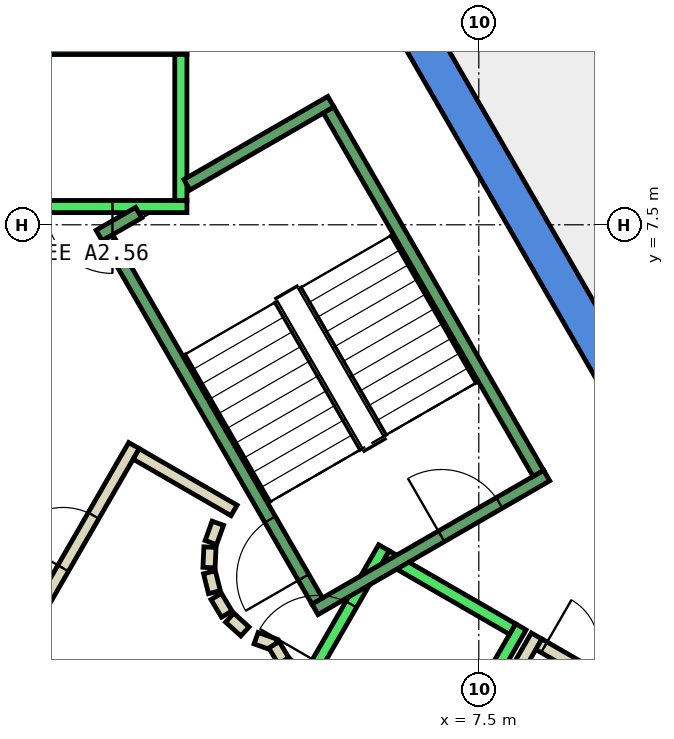
"""IFC4 building model, lengths in metres.
Left out: names, types, materials, properties, quantities, classifications, styles, units other than length and angle.
Written with IfcOpenShell. Run it as: python <this file> out.ifc"""

import sys

from ifc_helpers import new_model, si_unit, direction, frame, frame_2d, origin, place, context, subcontext, project, spatial, polyline, rectangle, outline, extrude, element, fill, save


model = new_model("IFC4")
c1 = context("Model", 3, precision=1e-05, world=origin(), true_north=direction((0.0, 1.0)))
c2 = subcontext(c1, "Body", "Model", "MODEL_VIEW")
j1 = project(units=[si_unit("LENGTHUNIT", "METRE"), si_unit("PLANEANGLEUNIT", "RADIAN")], contexts=[c1])
p1 = place(None, origin())
s1 = spatial("IfcSite", under=j1, at=p1, CompositionType="ELEMENT")
p2 = place(p1, origin())
s2 = spatial("IfcBuilding", under=s1, at=p2, CompositionType="ELEMENT")
p3 = place(p2, frame((0.0, 0.0, 266.6)))
s3 = spatial("IfcBuildingStorey", under=s2, at=p3, CompositionType="ELEMENT", Elevation=266.6)
p4 = place(p3, frame((0.0, 0.0, -0.34)))
e1 = element("IfcWall", 1, at=p4, inside=s3, PredefinedType="SHEAR", context=c2, shape_type="SweptSolid", body=[
    extrude(outline(polyline([(6.786, 10.747), (6.266, 10.447), (10.854, 2.5), (11.547, 2.5), (6.786, 10.747)])), origin(), (0.0, 0.0, 1.0), 3.6),
])
p5 = place(p3, frame((0.0, 0.0, -0.34)))
e2 = element("IfcWall", 2, at=p5, inside=s3, PredefinedType="SHEAR", context=c2, shape_type="SweptSolid", body=[
    extrude(outline(polyline([(5.774, -7.5), (11.547, 2.5), (10.854, 2.5), (5.427, -6.9), (5.774, -7.5)])), origin(), (0.0, 0.0, 1.0), 3.6),
])
p6 = place(p3, frame((9.281, 12.779, 0.0), z_axis=(0.0, 0.0, 1.0), x_axis=(0.515568955032, -0.856848091908, 0.0)))
e3 = element("IfcWall", 3, at=p6, inside=s3, PredefinedType="PARTITIONING", context=c2, shape_type="SweptSolid", body=[
    extrude(rectangle(XDim=3.177, YDim=0.2, at=frame_2d((1.588, 0.0))), origin(), (0.0, 0.0, 1.0), 3.26),
])
p7 = place(p3, frame((5.751, -3.938, 0.0), z_axis=(0.0, 0.0, 1.0), x_axis=(0.500034260056, 0.866005622828, 0.0)))
e4 = element("IfcWall", 4, at=p7, inside=s3, PredefinedType="PARTITIONING", context=c2, shape_type="SweptSolid", body=[
    extrude(rectangle(XDim=5.399, YDim=0.2, at=frame_2d((2.7, 0.0))), origin(), (0.0, 0.0, 1.0), 3.26),
])
p8 = place(p3, frame((8.488, 0.602, 0.0), z_axis=(0.0, 0.0, 1.0), x_axis=(0.866063652425, -0.499933745558, 0.0)))
e5 = element("IfcWall", 5, at=p8, inside=s3, PredefinedType="PARTITIONING", context=c2, shape_type="SweptSolid", body=[
    extrude(rectangle(XDim=1.1, YDim=0.2, at=frame_2d((0.55, 0.0))), origin(), (0.0, 0.0, 1.0), 3.26),
])
p9 = place(p8, frame((0.1, 0.0, 0.0)))
e6 = element("IfcOpeningElement", 6, at=p9, cuts=e5, PredefinedType="OPENING", context=c2, shape_type="SweptSolid", body=[
    extrude(rectangle(XDim=0.9, YDim=2.1, at=frame_2d((0.45, 1.05))), frame((0.0, 0.11, 0.0), z_axis=(0.0, -1.0, 0.0), x_axis=(1.0, 0.0, 0.0)), (0.0, 0.0, 1.0), 0.22),
])
p10 = place(p3, frame((0.05, 0.787, 0.0), z_axis=(0.0, 0.0, 1.0), x_axis=(0.499954076797, 0.866051915934, 0.0)))
e7 = element("IfcWall", 7, at=p10, inside=s3, PredefinedType="PARTITIONING", context=c2, shape_type="SweptSolid", body=[
    extrude(rectangle(XDim=3.558, YDim=0.2, at=frame_2d((1.779, 0.0))), origin(), (0.0, 0.0, 1.0), 3.26),
])
p11 = place(p10, frame((1.229, 0.0, 0.0)))
e8 = element("IfcOpeningElement", 8, at=p11, cuts=e7, PredefinedType="OPENING", context=c2, shape_type="SweptSolid", body=[
    extrude(rectangle(XDim=1.0, YDim=2.1, at=frame_2d((0.5, 1.05))), frame((0.0, 0.11, 0.0), z_axis=(0.0, -1.0, 0.0), x_axis=(1.0, 0.0, 0.0)), (0.0, 0.0, 1.0), 0.22),
])
p12 = place(p3, frame((1.866, 3.732, 0.0), z_axis=(0.0, 0.0, 1.0), x_axis=(0.866043361281, -0.499968895414, 0.0)))
e9 = element("IfcWall", 9, at=p12, inside=s3, PredefinedType="PARTITIONING", context=c2, shape_type="SweptSolid", body=[
    extrude(rectangle(XDim=1.858, YDim=0.2, at=frame_2d((0.929, 0.0))), origin(), (0.0, 0.0, 1.0), 3.26),
])
p13 = place(p3, frame((3.208, 2.592, 0.0), z_axis=(0.0, 0.0, 1.0), x_axis=(-0.337388820924, -0.941365382578, 0.0)))
e10 = element("IfcWall", 10, at=p13, inside=s3, PredefinedType="PARTITIONING", context=c2, shape_type="SweptSolid", body=[
    extrude(rectangle(XDim=0.338, YDim=0.2, at=frame_2d((0.169, 0.0))), origin(), (0.0, 0.0, 1.0), 3.26),
])
p14 = place(p3, frame((3.079, 2.199, 0.0), z_axis=(0.0, 0.0, 1.0), x_axis=(-0.047771483479, -0.998858290933, 0.0)))
e11 = element("IfcWall", 11, at=p14, inside=s3, PredefinedType="PARTITIONING", context=c2, shape_type="SweptSolid", body=[
    extrude(rectangle(XDim=0.337, YDim=0.2, at=frame_2d((0.169, 0.0))), origin(), (0.0, 0.0, 1.0), 3.26),
])
p15 = place(p3, frame((3.07, 1.786, 0.0), z_axis=(0.0, 0.0, 1.0), x_axis=(0.242705583207, -0.970099994784, 0.0)))
e12 = element("IfcWall", 12, at=p15, inside=s3, PredefinedType="PARTITIONING", context=c2, shape_type="SweptSolid", body=[
    extrude(rectangle(XDim=0.338, YDim=0.2, at=frame_2d((0.169, 0.0))), origin(), (0.0, 0.0, 1.0), 3.26),
])
for number, where, z_axis, x_axis in (
    (13, (3.182, 1.388, 0.0), (0.0, 0.0, 1.0), (0.512, -0.859, 0.0)),
    (14, (3.404, 1.039, 0.0), (0.0, 0.0, 1.0), (0.74, -0.672, 0.0)),
):
    element("IfcWall", number, at=place(p3, frame(where, z_axis=z_axis, x_axis=x_axis)), inside=s3, PredefinedType="PARTITIONING", context=c2, shape_type="SweptSolid", body=[
        extrude(rectangle(XDim=0.338, YDim=0.2, at=frame_2d((0.169, 0.0))), origin(), (0.0, 0.0, 1.0), 3.26),
    ])
p16 = place(p3, frame((3.838, 0.702, 0.0), z_axis=(0.0, 0.0, 1.0), x_axis=(0.941035081519, -0.338308993895, 0.0)))
e15 = element("IfcWall", 15, at=p16, inside=s3, PredefinedType="PARTITIONING", context=c2, shape_type="SweptSolid", body=[
    extrude(rectangle(XDim=0.337, YDim=0.2, at=frame_2d((0.168, 0.0))), origin(), (0.0, 0.0, 1.0), 3.26),
])
p17 = place(p3, frame((4.132, 0.593, 0.0), z_axis=(0.0, 0.0, 1.0), x_axis=(0.513561617048, -0.858052717201, 0.0)))
e16 = element("IfcWall", 16, at=p17, inside=s3, PredefinedType="PARTITIONING", context=c2, shape_type="SweptSolid", body=[
    extrude(rectangle(XDim=0.308, YDim=0.2, at=frame_2d((0.154, 0.0))), origin(), (0.0, 0.0, 1.0), 3.26),
])
p18 = place(p3, frame((4.301, 0.315, 0.0), z_axis=(0.0, 0.0, 1.0), x_axis=(0.741798017506, -0.670623367639, 0.0)))
e17 = element("IfcWall", 17, at=p18, inside=s3, PredefinedType="PARTITIONING", context=c2, shape_type="SweptSolid", body=[
    extrude(rectangle(XDim=0.309, YDim=0.2, at=frame_2d((0.154, 0.0))), origin(), (0.0, 0.0, 1.0), 3.26),
])
p19 = place(p3, frame((9.25, -4.878, 0.0), z_axis=(0.0, 0.0, 1.0), x_axis=(0.499982416899, 0.866035555154, 0.0)))
e18 = element("IfcWall", 18, at=p19, inside=s3, PredefinedType="PARTITIONING", context=c2, shape_type="SweptSolid", body=[
    extrude(rectangle(XDim=8.048, YDim=0.15, at=frame_2d((4.024, 0.0))), origin(), (0.0, 0.0, 1.0), 3.26),
])
p20 = place(p3, frame((2.7, 7.8, 0.0), z_axis=(0.0, 0.0, 1.0), x_axis=(-1.0, 0.0, 0.0)))
e19 = element("IfcWall", 19, at=p20, inside=s3, PredefinedType="STANDARD", context=c2, shape_type="SweptSolid", body=[
    extrude(rectangle(XDim=5.4, YDim=0.2, at=frame_2d((2.7, 0.0))), origin(), (0.0, 0.0, 1.0), 3.26),
])
p21 = place(p20, frame((1.225, 0.0, 0.0)))
e20 = element("IfcOpeningElement", 20, at=p21, cuts=e19, PredefinedType="OPENING", context=c2, shape_type="SweptSolid", body=[
    extrude(rectangle(XDim=1.1, YDim=2.1, at=frame_2d((0.55, 1.05))), frame((0.0, 0.11, 0.0), z_axis=(0.0, -1.0, 0.0), x_axis=(1.0, 0.0, 0.0)), (0.0, 0.0, 1.0), 0.22),
])
p22 = place(p20, frame((3.075, 0.0, 0.0)))
e21 = element("IfcOpeningElement", 21, at=p22, cuts=e19, PredefinedType="OPENING", context=c2, shape_type="SweptSolid", body=[
    extrude(rectangle(XDim=1.1, YDim=2.1, at=frame_2d((0.55, 1.05))), frame((0.0, 0.11, 0.0), z_axis=(0.0, -1.0, 0.0), x_axis=(1.0, 0.0, 0.0)), (0.0, 0.0, 1.0), 0.22),
])
p23 = place(p3, frame((2.7, 10.4, 0.0), z_axis=(0.0, 0.0, 1.0), x_axis=(-1.0, 0.0, 0.0)))
e22 = element("IfcWall", 22, at=p23, inside=s3, PredefinedType="STANDARD", context=c2, shape_type="SweptSolid", body=[
    extrude(rectangle(XDim=5.4, YDim=0.2, at=frame_2d((2.7, 0.0))), origin(), (0.0, 0.0, 1.0), 3.26),
])
p24 = place(p3, frame((2.6, 7.9, 0.0), z_axis=(0.0, 0.0, 1.0), x_axis=(0.0, 1.0, 0.0)))
e23 = element("IfcWall", 23, at=p24, inside=s3, PredefinedType="STANDARD", context=c2, shape_type="SweptSolid", body=[
    extrude(rectangle(XDim=2.4, YDim=0.2, at=frame_2d((1.2, 0.0))), origin(), (0.0, 0.0, 1.0), 3.26),
])
p25 = place(p3, frame((3.24, -2.488, 0.0), z_axis=(0.0, 0.0, 1.0), x_axis=(0.500034260056, 0.866005622828, 0.0)))
e24 = element("IfcWall", 24, at=p25, inside=s3, PredefinedType="STANDARD", context=c2, shape_type="SweptSolid", body=[
    extrude(rectangle(XDim=5.399, YDim=0.2, at=frame_2d((2.7, 0.0))), origin(), (0.0, 0.0, 1.0), 3.26),
])
p26 = place(p25, frame((3.225, 0.0, 0.0)))
e25 = element("IfcOpeningElement", 25, at=p26, cuts=e24, PredefinedType="OPENING", context=c2, shape_type="SweptSolid", body=[
    extrude(rectangle(XDim=1.1, YDim=2.1, at=frame_2d((0.55, 1.05))), frame((0.0, 0.11, 0.0), z_axis=(0.0, -1.0, 0.0), x_axis=(1.0, 0.0, 0.0)), (0.0, 0.0, 1.0), 0.22),
])
p27 = place(p25, frame((1.225, 0.0, 0.0)))
e26 = element("IfcOpeningElement", 26, at=p27, cuts=e24, PredefinedType="OPENING", context=c2, shape_type="SweptSolid", body=[
    extrude(rectangle(XDim=1.1, YDim=2.1, at=frame_2d((0.55, 1.05))), frame((0.0, 0.11, 0.0), z_axis=(0.0, -1.0, 0.0), x_axis=(1.0, 0.0, 0.0)), (0.0, 0.0, 1.0), 0.22),
])
p28 = place(p3, frame((5.492, -3.788, 0.0), z_axis=(0.0, 0.0, 1.0), x_axis=(0.500034260056, 0.866005622828, 0.0)))
e27 = element("IfcWall", 27, at=p28, inside=s3, PredefinedType="STANDARD", context=c2, shape_type="SweptSolid", body=[
    extrude(rectangle(XDim=5.399, YDim=0.2, at=frame_2d((2.7, 0.0))), origin(), (0.0, 0.0, 1.0), 3.26),
])
p29 = place(p3, frame((5.977, 2.052, 0.0), z_axis=(0.0, 0.0, 1.0), x_axis=(0.865973769406, -0.500089422704, 0.0)))
e28 = element("IfcWall", 28, at=p29, inside=s3, PredefinedType="STANDARD", context=c2, shape_type="SweptSolid", body=[
    extrude(rectangle(XDim=2.399, YDim=0.2, at=frame_2d((1.2, 0.0))), origin(), (0.0, 0.0, 1.0), 3.26),
])
p30 = place(p3, frame((4.806, 1.176, 0.0), z_axis=(0.0, 0.0, 1.0), x_axis=(0.866059941101, 0.499940174841, 0.0)))
e29 = element("IfcWall", 29, at=p30, inside=s3, PredefinedType="STANDARD", context=c2, shape_type="SweptSolid", body=[
    extrude(rectangle(XDim=4.4, YDim=0.2, at=frame_2d((2.2, 0.0))), origin(), (0.0, 0.0, 1.0), 3.26),
])
p31 = place(p30, frame((2.4, 0.0, 0.0)))
e30 = element("IfcOpeningElement", 30, at=p31, cuts=e29, PredefinedType="OPENING", context=c2, shape_type="SweptSolid", body=[
    extrude(rectangle(XDim=1.1, YDim=2.2, at=frame_2d((0.55, 1.1))), frame((0.0, 0.11, 0.0), z_axis=(0.0, -1.0, 0.0), x_axis=(1.0, 0.0, 0.0)), (0.0, 0.0, 1.0), 0.22),
])
p32 = place(p3, frame((2.7, 8.158, 0.0), z_axis=(0.0, 0.0, 1.0), x_axis=(0.86611865017, 0.499838457731, 0.0)))
e31 = element("IfcWall", 31, at=p32, inside=s3, PredefinedType="STANDARD", context=c2, shape_type="SweptSolid", body=[
    extrude(rectangle(XDim=2.733, YDim=0.2, at=frame_2d((1.366, 0.0))), origin(), (0.0, 0.0, 1.0), 3.26),
])
p33 = place(p3, frame((1.256, 7.324, 0.0), z_axis=(0.0, 0.0, 1.0), x_axis=(0.865915093549, 0.500191014278, 0.0)))
e32 = element("IfcWall", 32, at=p33, inside=s3, PredefinedType="STANDARD", context=c2, shape_type="SweptSolid", body=[
    extrude(rectangle(XDim=0.752, YDim=0.2, at=frame_2d((0.376, 0.0))), origin(), (0.0, 0.0, 1.0), 3.26),
])
p34 = place(p3, frame((4.843, 1.312, 0.0), z_axis=(0.0, 0.0, 1.0), x_axis=(-0.499963383562, 0.866046543262, 0.0)))
e33 = element("IfcWall", 33, at=p34, inside=s3, PredefinedType="STANDARD", context=c2, shape_type="SweptSolid", body=[
    extrude(rectangle(XDim=6.9, YDim=0.2, at=frame_2d((3.45, 0.0))), origin(), (0.0, 0.0, 1.0), 3.26),
])
p35 = place(p34, frame((0.45, 0.0, 0.0)))
e34 = element("IfcOpeningElement", 34, at=p35, cuts=e33, PredefinedType="OPENING", context=c2, shape_type="SweptSolid", body=[
    extrude(rectangle(XDim=1.1, YDim=2.2, at=frame_2d((0.55, 1.1))), frame((0.0, 0.11, 0.0), z_axis=(0.0, -1.0, 0.0), x_axis=(1.0, 0.0, 0.0)), (0.0, 0.0, 1.0), 0.22),
])
p36 = place(p3, frame((8.48, 3.412, 0.0), z_axis=(0.0, 0.0, 1.0), x_axis=(-0.499978703459, 0.866037698999, 0.0)))
e35 = element("IfcWall", 35, at=p36, inside=s3, PredefinedType="STANDARD", context=c2, shape_type="SweptSolid", body=[
    extrude(rectangle(XDim=6.9, YDim=0.2, at=frame_2d((3.45, 0.0))), origin(), (0.0, 0.0, 1.0), 3.26),
])
p37 = place(p11, origin())
e36 = element("IfcDoor", 36, at=p37, inside=s3, OperationType="SINGLE_SWING_RIGHT", PredefinedType="DOOR", context=c2, shape_type="SweptSolid", body=[
    extrude(rectangle(XDim=1.0, YDim=2.1, at=frame_2d((0.5, 1.05))), frame((0.0, 0.025, 0.0), z_axis=(0.0, -1.0, 0.0), x_axis=(1.0, 0.0, 0.0)), (0.0, 0.0, 1.0), 0.05),
])
fill(e8, e36)
p38 = place(p9, origin())
e37 = element("IfcDoor", 37, at=p38, inside=s3, OperationType="SINGLE_SWING_RIGHT", PredefinedType="DOOR", context=c2, shape_type="SweptSolid", body=[
    extrude(rectangle(XDim=0.9, YDim=2.1, at=frame_2d((0.45, 1.05))), frame((0.0, 0.025, 0.0), z_axis=(0.0, -1.0, 0.0), x_axis=(1.0, 0.0, 0.0)), (0.0, 0.0, 1.0), 0.05),
])
fill(e6, e37)
p39 = place(p21, origin())
e38 = element("IfcDoor", 38, at=p39, inside=s3, OperationType="SLIDING_TO_LEFT", PredefinedType="DOOR", context=c2, shape_type="SweptSolid", body=[
    extrude(rectangle(XDim=1.1, YDim=2.1, at=frame_2d((0.55, 1.05))), frame((0.0, 0.025, 0.0), z_axis=(0.0, -1.0, 0.0), x_axis=(1.0, 0.0, 0.0)), (0.0, 0.0, 1.0), 0.05),
])
fill(e20, e38)
p40 = place(p26, origin())
e39 = element("IfcDoor", 39, at=p40, inside=s3, OperationType="SLIDING_TO_LEFT", PredefinedType="DOOR", context=c2, shape_type="SweptSolid", body=[
    extrude(rectangle(XDim=1.1, YDim=2.1, at=frame_2d((0.55, 1.05))), frame((0.0, 0.025, 0.0), z_axis=(0.0, -1.0, 0.0), x_axis=(1.0, 0.0, 0.0)), (0.0, 0.0, 1.0), 0.05),
])
fill(e25, e39)
p41 = place(p35, origin())
e40 = element("IfcDoor", 40, at=p41, inside=s3, OperationType="SINGLE_SWING_LEFT", PredefinedType="DOOR", context=c2, shape_type="SweptSolid", body=[
    extrude(rectangle(XDim=1.1, YDim=2.2, at=frame_2d((0.55, 1.1))), frame((0.0, 0.025, 0.0), z_axis=(0.0, -1.0, 0.0), x_axis=(1.0, 0.0, 0.0)), (0.0, 0.0, 1.0), 0.05),
])
fill(e34, e40)
p42 = place(p31, origin())
e41 = element("IfcDoor", 41, at=p42, inside=s3, OperationType="SINGLE_SWING_LEFT", PredefinedType="DOOR", context=c2, shape_type="SweptSolid", body=[
    extrude(rectangle(XDim=1.1, YDim=2.2, at=frame_2d((0.55, 1.1))), frame((0.0, 0.025, 0.0), z_axis=(0.0, -1.0, 0.0), x_axis=(1.0, 0.0, 0.0)), (0.0, 0.0, 1.0), 0.05),
])
fill(e30, e41)
save(model, sys.argv[1])
